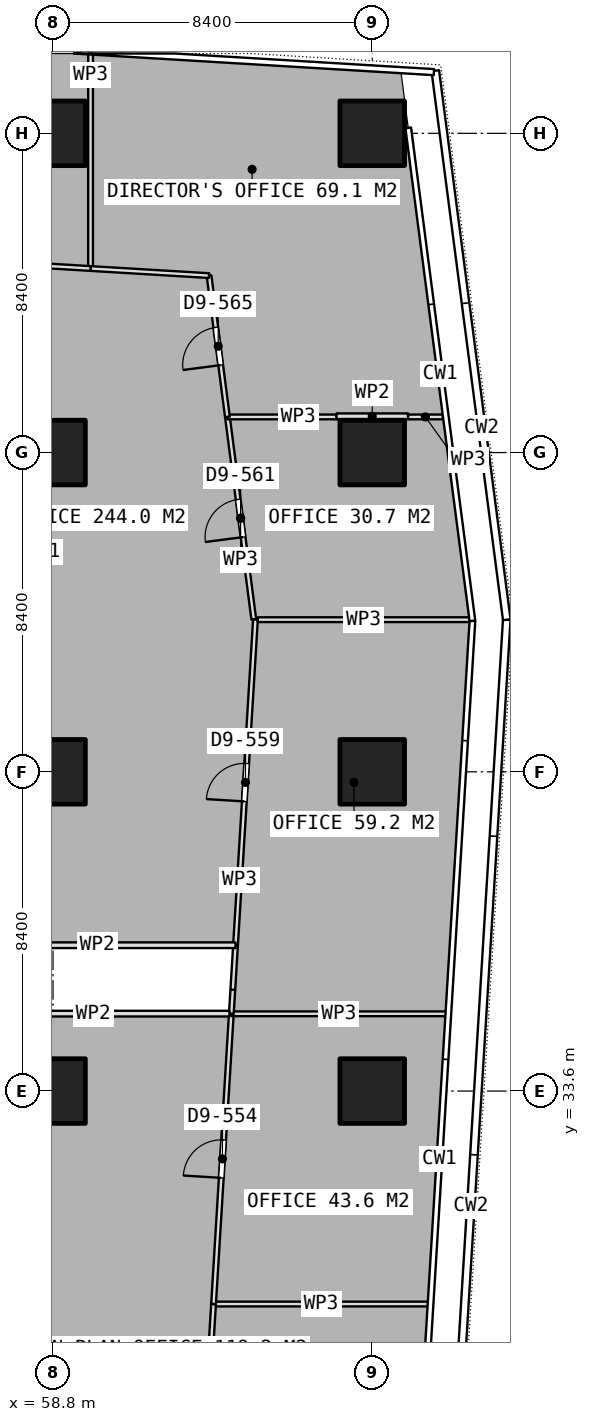
"""IFC4 building model, lengths in metres.
Left out: names, types, materials, properties, quantities, classifications, styles, units other than length and angle.
Written with IfcOpenShell. Run it as: python <this file> out.ifc"""

import sys

from ifc_helpers import new_model, si_unit, direction, frame, frame_2d, origin, origin_2d, place, context, subcontext, project, spatial, rectangle, extrude, element, fill, save


model = new_model("IFC4")
c1 = context("Model", 3, precision=1e-05, world=origin(), true_north=direction((0.0, 1.0)))
c2 = subcontext(c1, "Body", "Model", "MODEL_VIEW")
j1 = project(units=[si_unit("LENGTHUNIT", "METRE"), si_unit("PLANEANGLEUNIT", "RADIAN")], contexts=[c1])
p1 = place(None, origin())
s1 = spatial("IfcSite", under=j1, at=p1, CompositionType="ELEMENT")
p2 = place(p1, origin())
s2 = spatial("IfcBuilding", under=s1, at=p2, CompositionType="ELEMENT")
p3 = place(p2, frame((0.0, 0.0, 140.3)))
s3 = spatial("IfcBuildingStorey", under=s2, at=p3, CompositionType="ELEMENT", Elevation=140.3)
for number, where, z_axis, x_axis in (
    (1, (58.8, 33.6, 0.0), (0.0, 0.0, 1.0), (1.0, 0.0, 0.0)),
    (2, (58.8, 42.0, 0.0), (0.0, 0.0, 1.0), (1.0, 0.0, 0.0)),
    (3, (58.8, 50.4, 0.0), (0.0, 0.0, 1.0), (1.0, 0.0, 0.0)),
    (4, (58.8, 58.8, 0.0), (0.0, 0.0, 1.0), (1.0, 0.0, 0.0)),
    (5, (67.2, 33.6, 0.0), (0.0, 0.0, 1.0), (1.0, 0.0, 0.0)),
    (6, (67.2, 42.0, 0.0), (0.0, 0.0, 1.0), (1.0, 0.0, 0.0)),
    (7, (67.2, 50.4, 0.0), (0.0, 0.0, 1.0), (1.0, 0.0, 0.0)),
    (8, (67.2, 58.8, 0.0), (0.0, 0.0, 1.0), (1.0, 0.0, 0.0)),
):
    element("IfcColumn", number, at=place(p3, frame(where, z_axis=z_axis, x_axis=x_axis)), inside=s3, PredefinedType="COLUMN", context=c2, shape_type="SweptSolid", body=[
        extrude(rectangle(XDim=1.7, YDim=1.7, at=origin_2d()), origin(), (0.0, 0.0, 1.0), 3.75),
    ])
p4 = place(p3, frame((63.024, 27.996, 0.0), z_axis=(0.0, 0.0, 1.0), x_axis=(1.0, 0.0, 0.0)))
e9 = element("IfcWall", 9, at=p4, inside=s3, PredefinedType="PARTITIONING", context=c2, shape_type="SweptSolid", body=[
    extrude(rectangle(XDim=5.66, YDim=0.125, at=frame_2d((2.83, 0.0))), origin(), (0.0, 0.0, 1.0), 3.5),
])
p5 = place(p3, frame((62.627, 21.517, 0.0), z_axis=(0.0, 0.0, 1.0), x_axis=(0.061155945859, 0.998128223369, 0.0)))
e10 = element("IfcWall", 10, at=p5, inside=s3, PredefinedType="PARTITIONING", context=c2, shape_type="SweptSolid", body=[
    extrude(rectangle(XDim=6.491, YDim=0.125, at=frame_2d((3.246, 0.0))), origin(), (0.0, 0.0, 1.0), 3.5),
])
p6 = place(p5, frame((2.746, 0.0, 0.0)))
e11 = element("IfcOpeningElement", 11, at=p6, cuts=e10, PredefinedType="OPENING", context=c2, shape_type="SweptSolid", body=[
    extrude(rectangle(XDim=1.0, YDim=2.1, at=frame_2d((0.5, 1.05))), frame((0.0, 0.073, 0.0), z_axis=(0.0, -1.0, 0.0), x_axis=(1.0, 0.0, 0.0)), (0.0, 0.0, 1.0), 0.145),
])
p7 = place(p3, frame((63.024, 27.997, 0.0), z_axis=(0.0, 0.0, 1.0), x_axis=(0.061176245149, 0.998126979412, 0.0)))
e12 = element("IfcWall", 12, at=p7, inside=s3, PredefinedType="PARTITIONING", context=c2, shape_type="SweptSolid", body=[
    extrude(rectangle(XDim=7.65, YDim=0.125, at=frame_2d((3.825, 0.0))), origin(), (0.0, 0.0, 1.0), 3.5),
])
p8 = place(p7, frame((3.325, 0.0, 0.0)))
e13 = element("IfcOpeningElement", 13, at=p8, cuts=e12, PredefinedType="OPENING", context=c2, shape_type="SweptSolid", body=[
    extrude(rectangle(XDim=1.0, YDim=2.1, at=frame_2d((0.5, 1.05))), frame((0.0, 0.073, 0.0), z_axis=(0.0, -1.0, 0.0), x_axis=(1.0, 0.0, 0.0)), (0.0, 0.0, 1.0), 0.145),
])
p9 = place(p3, frame((63.492, 35.633, 0.0), z_axis=(0.0, 0.0, 1.0), x_axis=(1.0, 0.0, 0.0)))
e14 = element("IfcWall", 14, at=p9, inside=s3, PredefinedType="PARTITIONING", context=c2, shape_type="SweptSolid", body=[
    extrude(rectangle(XDim=5.66, YDim=0.125, at=frame_2d((2.83, 0.0))), origin(), (0.0, 0.0, 1.0), 3.5),
])
p10 = place(p3, frame((63.602, 37.437, 0.0), z_axis=(0.0, 0.0, 1.0), x_axis=(0.06111295292, 0.998130856644, 0.0)))
e15 = element("IfcWall", 15, at=p10, inside=s3, PredefinedType="PARTITIONING", context=c2, shape_type="SweptSolid", body=[
    extrude(rectangle(XDim=8.589, YDim=0.125, at=frame_2d((4.294, 0.0))), origin(), (0.0, 0.0, 1.0), 3.5),
])
p11 = place(p10, frame((3.791, 0.0, 0.0)))
e16 = element("IfcOpeningElement", 16, at=p11, cuts=e15, PredefinedType="OPENING", context=c2, shape_type="SweptSolid", body=[
    extrude(rectangle(XDim=1.0, YDim=2.1, at=frame_2d((0.5, 1.05))), frame((0.0, 0.073, 0.0), z_axis=(0.0, -1.0, 0.0), x_axis=(1.0, 0.0, 0.0)), (0.0, 0.0, 1.0), 0.145),
])
p12 = place(p3, frame((64.189, 46.003, 0.0), z_axis=(0.0, 0.0, 1.0), x_axis=(1.0, 0.0, 0.0)))
e17 = element("IfcWall", 17, at=p12, inside=s3, PredefinedType="PARTITIONING", context=c2, shape_type="SweptSolid", body=[
    extrude(rectangle(XDim=5.562, YDim=0.125, at=frame_2d((2.781, 0.0))), origin(), (0.0, 0.0, 1.0), 3.5),
])
p13 = place(p3, frame((63.492, 35.634, 0.0), z_axis=(0.0, 0.0, 1.0), x_axis=(0.061682245647, 0.998095837368, 0.0)))
e18 = element("IfcWall", 18, at=p13, inside=s3, PredefinedType="PARTITIONING", context=c2, shape_type="SweptSolid", body=[
    extrude(rectangle(XDim=0.633, YDim=0.125, at=frame_2d((0.317, 0.0))), origin(), (0.0, 0.0, 1.0), 3.5),
])
p14 = place(p3, frame((63.531, 36.266, 0.0), z_axis=(0.0, 0.0, 1.0), x_axis=(0.060564181147, 0.998164305093, 0.0)))
e19 = element("IfcWall", 19, at=p14, inside=s3, PredefinedType="PARTITIONING", context=c2, shape_type="SweptSolid", body=[
    extrude(rectangle(XDim=1.173, YDim=0.125, at=frame_2d((0.586, 0.0))), origin(), (0.0, 0.0, 1.0), 3.5),
])
p15 = place(p3, frame((64.083, 46.013, 0.0), z_axis=(0.0, 0.0, 1.0), x_axis=(-0.129253664266, 0.991611562192, 0.0)))
e20 = element("IfcWall", 20, at=p15, inside=s3, PredefinedType="PARTITIONING", context=c2, shape_type="SweptSolid", body=[
    extrude(rectangle(XDim=5.37, YDim=0.125, at=frame_2d((2.685, 0.0))), origin(), (0.0, 0.0, 1.0), 3.5),
])
p16 = place(p15, frame((2.181, 0.0, 0.0)))
e21 = element("IfcOpeningElement", 21, at=p16, cuts=e20, PredefinedType="OPENING", context=c2, shape_type="SweptSolid", body=[
    extrude(rectangle(XDim=1.0, YDim=2.1, at=frame_2d((0.5, 1.05))), frame((0.0, 0.073, 0.0), z_axis=(0.0, -1.0, 0.0), x_axis=(1.0, 0.0, 0.0)), (0.0, 0.0, 1.0), 0.145),
])
p17 = place(p3, frame((63.389, 51.338, 0.0), z_axis=(0.0, 0.0, 1.0), x_axis=(1.0, 0.0, 0.0)))
e22 = element("IfcWall", 22, at=p17, inside=s3, PredefinedType="PARTITIONING", context=c2, shape_type="SweptSolid", body=[
    extrude(rectangle(XDim=2.871, YDim=0.125, at=frame_2d((1.436, 0.0))), origin(), (0.0, 0.0, 1.0), 3.5),
])
p18 = place(p3, frame((68.14, 51.338, 0.0), z_axis=(0.0, 0.0, 1.0), x_axis=(1.0, 0.0, 0.0)))
e23 = element("IfcWall", 23, at=p18, inside=s3, PredefinedType="PARTITIONING", context=c2, shape_type="SweptSolid", body=[
    extrude(rectangle(XDim=0.917, YDim=0.125, at=frame_2d((0.458, 0.0))), origin(), (0.0, 0.0, 1.0), 3.5),
])
p19 = place(p3, frame((59.788, 55.243, 0.0), z_axis=(0.0, 0.0, 1.0), x_axis=(0.0, 1.0, 0.0)))
e24 = element("IfcWall", 24, at=p19, inside=s3, PredefinedType="PARTITIONING", context=c2, shape_type="SweptSolid", body=[
    extrude(rectangle(XDim=5.66, YDim=0.125, at=frame_2d((2.83, 0.0))), origin(), (0.0, 0.0, 1.0), 3.5),
])
p20 = place(p3, frame((63.389, 51.339, 0.0), z_axis=(0.0, 0.0, 1.0), x_axis=(-0.129099702307, 0.991631618528, 0.0)))
e25 = element("IfcWall", 25, at=p20, inside=s3, PredefinedType="PARTITIONING", context=c2, shape_type="SweptSolid", body=[
    extrude(rectangle(XDim=3.748, YDim=0.125, at=frame_2d((1.874, 0.0))), origin(), (0.0, 0.0, 1.0), 3.5),
])
p21 = place(p20, frame((1.374, 0.0, 0.0)))
e26 = element("IfcOpeningElement", 26, at=p21, cuts=e25, PredefinedType="OPENING", context=c2, shape_type="SweptSolid", body=[
    extrude(rectangle(XDim=1.0, YDim=2.1, at=frame_2d((0.5, 1.05))), frame((0.0, 0.073, 0.0), z_axis=(0.0, -1.0, 0.0), x_axis=(1.0, 0.0, 0.0)), (0.0, 0.0, 1.0), 0.145),
])
p22 = place(p3, frame((62.905, 55.056, 0.0), z_axis=(0.0, 0.0, 1.0), x_axis=(-0.998204938952, 0.05989073261, 0.0)))
e27 = element("IfcWall", 27, at=p22, inside=s3, PredefinedType="PARTITIONING", context=c2, shape_type="SweptSolid", body=[
    extrude(rectangle(XDim=3.123, YDim=0.125, at=frame_2d((1.561, 0.0))), origin(), (0.0, 0.0, 1.0), 3.5),
])
p23 = place(p3, frame((59.787, 55.243, 0.0), z_axis=(0.0, 0.0, 1.0), x_axis=(-0.998199491257, 0.059981460928, 0.0)))
e28 = element("IfcWall", 28, at=p23, inside=s3, PredefinedType="PARTITIONING", context=c2, shape_type="SweptSolid", body=[
    extrude(rectangle(XDim=6.602, YDim=0.125, at=frame_2d((3.301, 0.0))), origin(), (0.0, 0.0, 1.0), 3.5),
])
p24 = place(p23, frame((2.801, 0.0, 0.0)))
e29 = element("IfcOpeningElement", 29, at=p24, cuts=e28, PredefinedType="OPENING", context=c2, shape_type="SweptSolid", body=[
    extrude(rectangle(XDim=1.0, YDim=2.1, at=frame_2d((0.5, 1.05))), frame((0.0, 0.073, 0.0), z_axis=(0.0, -1.0, 0.0), x_axis=(1.0, 0.0, 0.0)), (0.0, 0.0, 1.0), 0.145),
])
p25 = place(p3, frame((66.26, 51.355, 0.0), z_axis=(0.0, 0.0, 1.0), x_axis=(1.0, 0.0, 0.0)))
e30 = element("IfcWall", 30, at=p25, inside=s3, PredefinedType="PARTITIONING", context=c2, shape_type="SweptSolid", body=[
    extrude(rectangle(XDim=1.88, YDim=0.15, at=frame_2d((0.94, 0.0))), origin(), (0.0, 0.0, 1.0), 3.5),
])
p26 = place(p3, frame((63.602, 37.437, 0.0), z_axis=(0.0, 0.0, 1.0), x_axis=(-1.0, 0.0, 0.0)))
e31 = element("IfcWall", 31, at=p26, inside=s3, PredefinedType="PARTITIONING", context=c2, shape_type="SweptSolid", body=[
    extrude(rectangle(XDim=10.402, YDim=0.15, at=frame_2d((5.201, 0.0))), origin(), (0.0, 0.0, 1.0), 3.5),
])
p27 = place(p3, frame((53.2, 35.637, 0.0), z_axis=(0.0, 0.0, 1.0), x_axis=(1.0, 0.0, 0.0)))
e32 = element("IfcWall", 32, at=p27, inside=s3, PredefinedType="PARTITIONING", context=c2, shape_type="SweptSolid", body=[
    extrude(rectangle(XDim=10.243, YDim=0.15, at=frame_2d((5.122, 0.0))), origin(), (0.0, 0.0, 1.0), 3.5),
])
p28 = place(p27, frame((3.846, 0.0, 0.0)))
e33 = element("IfcOpeningElement", 33, at=p28, cuts=e32, PredefinedType="OPENING", context=c2, shape_type="SweptSolid", body=[
    extrude(rectangle(XDim=1.0, YDim=2.1, at=frame_2d((0.5, 1.05))), frame((0.0, 0.085, 0.0), z_axis=(0.0, -1.0, 0.0), x_axis=(1.0, 0.0, 0.0)), (0.0, 0.0, 1.0), 0.17),
])
p29 = place(p8, origin())
e34 = element("IfcDoor", 34, at=p29, inside=s3, OperationType="SINGLE_SWING_LEFT", PredefinedType="DOOR", context=c2, shape_type="SweptSolid", body=[
    extrude(rectangle(XDim=1.0, YDim=2.1, at=frame_2d((0.5, 1.05))), frame((0.0, 0.025, 0.0), z_axis=(0.0, -1.0, 0.0), x_axis=(1.0, 0.0, 0.0)), (0.0, 0.0, 1.0), 0.05),
])
fill(e13, e34)
p30 = place(p11, origin())
e35 = element("IfcDoor", 35, at=p30, inside=s3, OperationType="SINGLE_SWING_LEFT", PredefinedType="DOOR", context=c2, shape_type="SweptSolid", body=[
    extrude(rectangle(XDim=1.0, YDim=2.1, at=frame_2d((0.5, 1.05))), frame((0.0, 0.025, 0.0), z_axis=(0.0, -1.0, 0.0), x_axis=(1.0, 0.0, 0.0)), (0.0, 0.0, 1.0), 0.05),
])
fill(e16, e35)
p31 = place(p16, origin())
e36 = element("IfcDoor", 36, at=p31, inside=s3, OperationType="SINGLE_SWING_LEFT", PredefinedType="DOOR", context=c2, shape_type="SweptSolid", body=[
    extrude(rectangle(XDim=1.0, YDim=2.1, at=frame_2d((0.5, 1.05))), frame((0.0, 0.025, 0.0), z_axis=(0.0, -1.0, 0.0), x_axis=(1.0, 0.0, 0.0)), (0.0, 0.0, 1.0), 0.05),
])
fill(e21, e36)
p32 = place(p21, origin())
e37 = element("IfcDoor", 37, at=p32, inside=s3, OperationType="SINGLE_SWING_LEFT", PredefinedType="DOOR", context=c2, shape_type="SweptSolid", body=[
    extrude(rectangle(XDim=1.0, YDim=2.1, at=frame_2d((0.5, 1.05))), frame((0.0, 0.025, 0.0), z_axis=(0.0, -1.0, 0.0), x_axis=(1.0, 0.0, 0.0)), (0.0, 0.0, 1.0), 0.05),
])
fill(e26, e37)
save(model, sys.argv[1])
